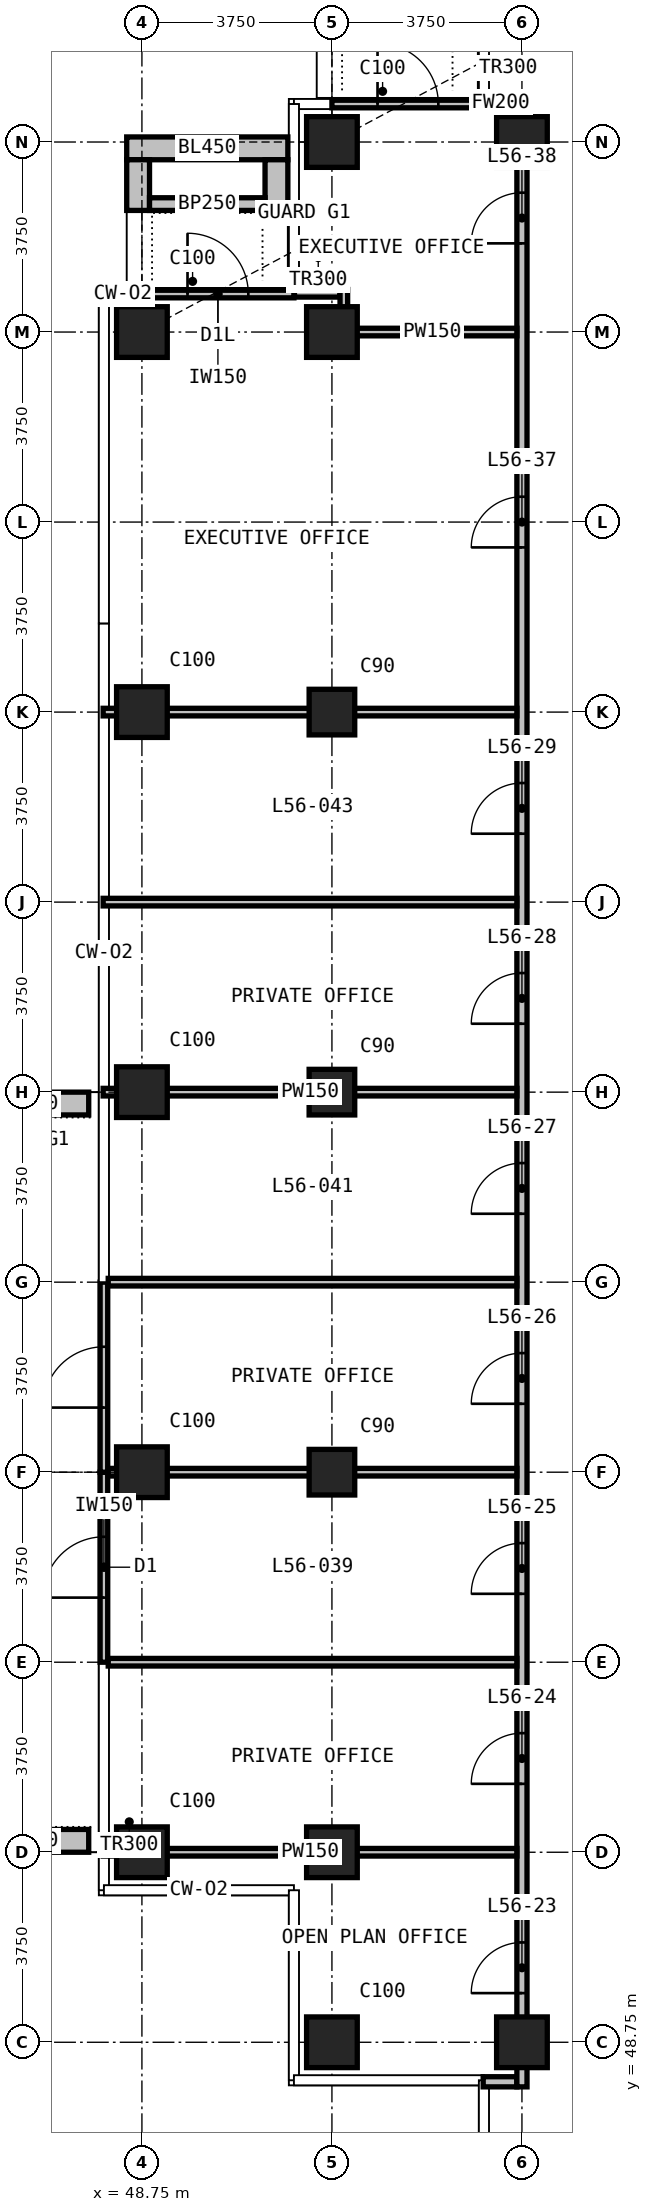
"""IFC4 building model, lengths in metres.
Left out: names, types, materials, properties, quantities, classifications, styles, units other than length and angle.
Written with IfcOpenShell. Run it as: python <this file> out.ifc"""

import sys

from ifc_helpers import new_model, si_unit, direction, frame, frame_2d, origin, origin_2d, place, context, subcontext, project, spatial, rectangle, extrude, element, fill, save


model = new_model("IFC4")
c1 = context("Model", 3, precision=1e-05, world=origin(), true_north=direction((0.0, 1.0)))
c2 = subcontext(c1, "Body", "Model", "MODEL_VIEW")
j1 = project(units=[si_unit("LENGTHUNIT", "METRE"), si_unit("PLANEANGLEUNIT", "RADIAN")], contexts=[c1])
p1 = place(None, origin())
s1 = spatial("IfcSite", under=j1, at=p1, CompositionType="ELEMENT")
p2 = place(p1, origin())
s2 = spatial("IfcBuilding", under=s1, at=p2, CompositionType="ELEMENT")
p3 = place(p2, frame((0.0, 0.0, 217.5)))
s3 = spatial("IfcBuildingStorey", under=s2, at=p3, CompositionType="ELEMENT", Elevation=217.5)
for number, where, z_axis, x_axis in (
    (1, (48.75, 52.5, 0.0), (0.0, 0.0, 1.0), (1.0, 0.0, 0.0)),
    (2, (48.75, 60.0, 0.0), (0.0, 0.0, 1.0), (1.0, 0.0, 0.0)),
    (3, (48.75, 67.5, 0.0), (0.0, 0.0, 1.0), (1.0, 0.0, 0.0)),
    (4, (48.75, 75.0, 0.0), (0.0, 0.0, 1.0), (1.0, 0.0, 0.0)),
    (5, (48.75, 82.5, 0.0), (0.0, 0.0, 1.0), (1.0, 0.0, 0.0)),
    (6, (52.5, 48.75, 0.0), (0.0, 0.0, 1.0), (1.0, 0.0, 0.0)),
    (7, (52.5, 52.5, 0.0), (0.0, 0.0, 1.0), (1.0, 0.0, 0.0)),
):
    element("IfcColumn", number, at=place(p3, frame(where, z_axis=z_axis, x_axis=x_axis)), inside=s3, PredefinedType="COLUMN", context=c2, shape_type="SweptSolid", body=[
        extrude(rectangle(XDim=1.0, YDim=1.0, at=origin_2d()), origin(), (0.0, 0.0, 1.0), 3.6),
    ])
for number, where, z_axis, x_axis in (
    (8, (52.5, 60.0, 0.0), (0.0, 0.0, 1.0), (1.0, 0.0, 0.0)),
    (9, (52.5, 67.5, 0.0), (0.0, 0.0, 1.0), (1.0, 0.0, 0.0)),
    (10, (52.5, 75.0, 0.0), (0.0, 0.0, 1.0), (1.0, 0.0, 0.0)),
):
    element("IfcColumn", number, at=place(p3, frame(where, z_axis=z_axis, x_axis=x_axis)), inside=s3, PredefinedType="COLUMN", context=c2, shape_type="SweptSolid", body=[
        extrude(rectangle(XDim=0.9, YDim=0.9, at=origin_2d()), origin(), (0.0, 0.0, 1.0), 3.6),
    ])
for number, where, z_axis, x_axis in (
    (11, (52.5, 82.5, 0.0), (0.0, 0.0, 1.0), (1.0, 0.0, 0.0)),
    (12, (52.5, 86.25, 0.0), (0.0, 0.0, 1.0), (1.0, 0.0, 0.0)),
    (13, (56.25, 48.75, 0.0), (0.0, 0.0, 1.0), (1.0, 0.0, 0.0)),
    (14, (56.25, 86.25, 0.0), (0.0, 0.0, 1.0), (1.0, 0.0, 0.0)),
):
    element("IfcColumn", number, at=place(p3, frame(where, z_axis=z_axis, x_axis=x_axis)), inside=s3, PredefinedType="COLUMN", context=c2, shape_type="SweptSolid", body=[
        extrude(rectangle(XDim=1.0, YDim=1.0, at=origin_2d()), origin(), (0.0, 0.0, 1.0), 3.6),
    ])
p4 = place(p3, frame((52.5, 87.0, 0.0), z_axis=(0.0, 0.0, 1.0), x_axis=(1.0, 0.0, 0.0)))
e15 = element("IfcWall", 15, at=p4, inside=s3, PredefinedType="SOLIDWALL", context=c2, shape_type="SweptSolid", body=[
    extrude(rectangle(XDim=3.0, YDim=0.15, at=frame_2d((1.5, 0.0))), origin(), (0.0, 0.0, 1.0), 3.3),
])
p5 = place(p4, frame((0.9, 0.0, 0.0)))
e16 = element("IfcOpeningElement", 16, at=p5, cuts=e15, PredefinedType="OPENING", context=c2, shape_type="SweptSolid", body=[
    extrude(rectangle(XDim=1.2, YDim=2.0, at=frame_2d((0.6, 1.0))), frame((0.0, 0.085, 0.0), z_axis=(0.0, -1.0, 0.0), x_axis=(1.0, 0.0, 0.0)), (0.0, 0.0, 1.0), 0.17),
])
p6 = place(p3, frame((48.75, 83.25, 0.0), z_axis=(0.0, 0.0, 1.0), x_axis=(1.0, 0.0, 0.0)))
e17 = element("IfcWall", 17, at=p6, inside=s3, PredefinedType="SOLIDWALL", context=c2, shape_type="SweptSolid", body=[
    extrude(rectangle(XDim=3.0, YDim=0.15, at=frame_2d((1.5, 0.0))), origin(), (0.0, 0.0, 1.0), 3.3),
])
p7 = place(p6, frame((0.9, 0.0, 0.0)))
e18 = element("IfcOpeningElement", 18, at=p7, cuts=e17, PredefinedType="OPENING", context=c2, shape_type="SweptSolid", body=[
    extrude(rectangle(XDim=1.2, YDim=2.0, at=frame_2d((0.6, 1.0))), frame((0.0, 0.085, 0.0), z_axis=(0.0, -1.0, 0.0), x_axis=(1.0, 0.0, 0.0)), (0.0, 0.0, 1.0), 0.17),
])
p8 = place(p3, frame((48.0, 56.25, 0.0), z_axis=(0.0, 0.0, 1.0), x_axis=(0.0, 1.0, 0.0)))
e19 = element("IfcWall", 19, at=p8, inside=s3, PredefinedType="SOLIDWALL", context=c2, shape_type="SweptSolid", body=[
    extrude(rectangle(XDim=3.75, YDim=0.15, at=frame_2d((1.875, 0.0))), origin(), (0.0, 0.0, 1.0), 3.3),
])
p9 = place(p8, frame((1.275, 0.0, 0.0)))
e20 = element("IfcOpeningElement", 20, at=p9, cuts=e19, PredefinedType="OPENING", context=c2, shape_type="SweptSolid", body=[
    extrude(rectangle(XDim=1.2, YDim=2.4, at=frame_2d((0.6, 1.2))), frame((0.0, 0.085, 0.0), z_axis=(0.0, -1.0, 0.0), x_axis=(1.0, 0.0, 0.0)), (0.0, 0.0, 1.0), 0.17),
])
p10 = place(p3, frame((48.0, 60.0, 0.0), z_axis=(0.0, 0.0, 1.0), x_axis=(0.0, 1.0, 0.0)))
e21 = element("IfcWall", 21, at=p10, inside=s3, PredefinedType="SOLIDWALL", context=c2, shape_type="SweptSolid", body=[
    extrude(rectangle(XDim=3.75, YDim=0.15, at=frame_2d((1.875, 0.0))), origin(), (0.0, 0.0, 1.0), 3.3),
])
p11 = place(p10, frame((1.275, 0.0, 0.0)))
e22 = element("IfcOpeningElement", 22, at=p11, cuts=e21, PredefinedType="OPENING", context=c2, shape_type="SweptSolid", body=[
    extrude(rectangle(XDim=1.2, YDim=2.4, at=frame_2d((0.6, 1.2))), frame((0.0, 0.085, 0.0), z_axis=(0.0, -1.0, 0.0), x_axis=(1.0, 0.0, 0.0)), (0.0, 0.0, 1.0), 0.17),
])
p12 = place(p3, frame((48.45, 86.125, 0.0), z_axis=(0.0, 0.0, 1.0), x_axis=(1.0, 0.0, 0.0)))
e23 = element("IfcWall", 23, at=p12, inside=s3, PredefinedType="USERDEFINED", context=c2, shape_type="SweptSolid", body=[
    extrude(rectangle(XDim=3.18, YDim=0.45, at=frame_2d((1.59, 0.0))), origin(), (0.0, 0.0, 1.0), 1.1),
])
for number, where, z_axis, x_axis in (
    (24, (48.675, 84.9, 0.0), (0.0, 0.0, 1.0), (0.0, 1.0, 0.0)),
    (25, (51.405, 84.9, 0.0), (0.0, 0.0, 1.0), (0.0, 1.0, 0.0)),
):
    element("IfcWall", number, at=place(p3, frame(where, z_axis=z_axis, x_axis=x_axis)), inside=s3, PredefinedType="USERDEFINED", context=c2, shape_type="SweptSolid", body=[
        extrude(rectangle(XDim=1.0, YDim=0.45, at=frame_2d((0.5, 0.0))), origin(), (0.0, 0.0, 1.0), 1.1),
    ])
p13 = place(p3, frame((48.9, 85.025, 0.0), z_axis=(0.0, 0.0, 1.0), x_axis=(1.0, 0.0, 0.0)))
e26 = element("IfcWall", 26, at=p13, inside=s3, PredefinedType="USERDEFINED", context=c2, shape_type="SweptSolid", body=[
    extrude(rectangle(XDim=2.28, YDim=0.25, at=frame_2d((1.14, 0.0))), origin(), (0.0, 0.0, 1.0), 1.0),
])
for number, where, z_axis, x_axis in (
    (27, (47.7, 52.725, 0.0), (0.0, 0.0, 1.0), (-1.0, 0.0, 0.0)),
    (28, (47.7, 67.275, 0.0), (0.0, 0.0, 1.0), (-1.0, 0.0, 0.0)),
):
    element("IfcWall", number, at=place(p3, frame(where, z_axis=z_axis, x_axis=x_axis)), inside=s3, PredefinedType="USERDEFINED", context=c2, shape_type="SweptSolid", body=[
        extrude(rectangle(XDim=2.35, YDim=0.45, at=frame_2d((1.175, 0.0))), origin(), (0.0, 0.0, 1.0), 1.1),
    ])
p14 = place(p3, frame((55.485, 47.97, 0.0), z_axis=(0.0, 0.0, 1.0), x_axis=(1.0, 0.0, 0.0)))
e29 = element("IfcWall", 29, at=p14, inside=s3, PredefinedType="PARTITIONING", context=c2, shape_type="SweptSolid", body=[
    extrude(rectangle(XDim=0.665, YDim=0.2, at=frame_2d((0.333, 0.0))), origin(), (0.0, 0.0, 1.0), 3.3),
])
p15 = place(p3, frame((55.51, 87.03, 0.0), z_axis=(0.0, 0.0, 1.0), x_axis=(1.0, 0.0, 0.0)))
e30 = element("IfcWall", 30, at=p15, inside=s3, PredefinedType="PARTITIONING", context=c2, shape_type="SweptSolid", body=[
    extrude(rectangle(XDim=0.64, YDim=0.2, at=frame_2d((0.32, 0.0))), origin(), (0.0, 0.0, 1.0), 3.3),
])
p16 = place(p3, frame((56.25, 47.87, 0.0), z_axis=(0.0, 0.0, 1.0), x_axis=(0.0, 1.0, 0.0)))
e31 = element("IfcWall", 31, at=p16, inside=s3, PredefinedType="PARTITIONING", context=c2, shape_type="SweptSolid", body=[
    extrude(rectangle(XDim=39.26, YDim=0.2, at=frame_2d((19.63, 0.0))), origin(), (0.0, 0.0, 1.0), 3.3),
])
p17 = place(p16, frame((1.85, 0.0, 0.0)))
e32 = element("IfcOpeningElement", 32, at=p17, cuts=e31, PredefinedType="OPENING", context=c2, shape_type="SweptSolid", body=[
    extrude(rectangle(XDim=1.0, YDim=2.2, at=frame_2d((0.5, 1.1))), frame((0.0, 0.11, 0.0), z_axis=(0.0, -1.0, 0.0), x_axis=(1.0, 0.0, 0.0)), (0.0, 0.0, 1.0), 0.22),
])
p18 = place(p16, frame((5.98, 0.0, 0.0)))
e33 = element("IfcOpeningElement", 33, at=p18, cuts=e31, PredefinedType="OPENING", context=c2, shape_type="SweptSolid", body=[
    extrude(rectangle(XDim=1.0, YDim=2.2, at=frame_2d((0.5, 1.1))), frame((0.0, 0.11, 0.0), z_axis=(0.0, -1.0, 0.0), x_axis=(1.0, 0.0, 0.0)), (0.0, 0.0, 1.0), 0.22),
])
p19 = place(p16, frame((9.73, 0.0, 0.0)))
e34 = element("IfcOpeningElement", 34, at=p19, cuts=e31, PredefinedType="OPENING", context=c2, shape_type="SweptSolid", body=[
    extrude(rectangle(XDim=1.0, YDim=2.2, at=frame_2d((0.5, 1.1))), frame((0.0, 0.11, 0.0), z_axis=(0.0, -1.0, 0.0), x_axis=(1.0, 0.0, 0.0)), (0.0, 0.0, 1.0), 0.22),
])
p20 = place(p16, frame((13.48, 0.0, 0.0)))
e35 = element("IfcOpeningElement", 35, at=p20, cuts=e31, PredefinedType="OPENING", context=c2, shape_type="SweptSolid", body=[
    extrude(rectangle(XDim=1.0, YDim=2.2, at=frame_2d((0.5, 1.1))), frame((0.0, 0.11, 0.0), z_axis=(0.0, -1.0, 0.0), x_axis=(1.0, 0.0, 0.0)), (0.0, 0.0, 1.0), 0.22),
])
p21 = place(p16, frame((17.23, 0.0, 0.0)))
e36 = element("IfcOpeningElement", 36, at=p21, cuts=e31, PredefinedType="OPENING", context=c2, shape_type="SweptSolid", body=[
    extrude(rectangle(XDim=1.0, YDim=2.2, at=frame_2d((0.5, 1.1))), frame((0.0, 0.11, 0.0), z_axis=(0.0, -1.0, 0.0), x_axis=(1.0, 0.0, 0.0)), (0.0, 0.0, 1.0), 0.22),
])
p22 = place(p16, frame((20.98, 0.0, 0.0)))
e37 = element("IfcOpeningElement", 37, at=p22, cuts=e31, PredefinedType="OPENING", context=c2, shape_type="SweptSolid", body=[
    extrude(rectangle(XDim=1.0, YDim=2.2, at=frame_2d((0.5, 1.1))), frame((0.0, 0.11, 0.0), z_axis=(0.0, -1.0, 0.0), x_axis=(1.0, 0.0, 0.0)), (0.0, 0.0, 1.0), 0.22),
])
p23 = place(p16, frame((24.73, 0.0, 0.0)))
e38 = element("IfcOpeningElement", 38, at=p23, cuts=e31, PredefinedType="OPENING", context=c2, shape_type="SweptSolid", body=[
    extrude(rectangle(XDim=1.0, YDim=2.2, at=frame_2d((0.5, 1.1))), frame((0.0, 0.11, 0.0), z_axis=(0.0, -1.0, 0.0), x_axis=(1.0, 0.0, 0.0)), (0.0, 0.0, 1.0), 0.22),
])
p24 = place(p16, frame((30.38, 0.0, 0.0)))
e39 = element("IfcOpeningElement", 39, at=p24, cuts=e31, PredefinedType="OPENING", context=c2, shape_type="SweptSolid", body=[
    extrude(rectangle(XDim=1.0, YDim=2.2, at=frame_2d((0.5, 1.1))), frame((0.0, 0.11, 0.0), z_axis=(0.0, -1.0, 0.0), x_axis=(1.0, 0.0, 0.0)), (0.0, 0.0, 1.0), 0.22),
])
p25 = place(p16, frame((36.38, 0.0, 0.0)))
e40 = element("IfcOpeningElement", 40, at=p25, cuts=e31, PredefinedType="OPENING", context=c2, shape_type="SweptSolid", body=[
    extrude(rectangle(XDim=1.0, YDim=2.2, at=frame_2d((0.5, 1.1))), frame((0.0, 0.11, 0.0), z_axis=(0.0, -1.0, 0.0), x_axis=(1.0, 0.0, 0.0)), (0.0, 0.0, 1.0), 0.22),
])
p26 = place(p3, frame((47.985, 52.5, 0.0), z_axis=(0.0, 0.0, 1.0), x_axis=(1.0, 0.0, 0.0)))
e41 = element("IfcWall", 41, at=p26, inside=s3, PredefinedType="PARTITIONING", context=c2, shape_type="SweptSolid", body=[
    extrude(rectangle(XDim=8.165, YDim=0.15, at=frame_2d((4.083, 0.0))), origin(), (0.0, 0.0, 1.0), 3.3),
])
for number, where, z_axis, x_axis in (
    (42, (48.085, 56.25, 0.0), (0.0, 0.0, 1.0), (1.0, 0.0, 0.0)),
    (43, (48.085, 60.0, 0.0), (0.0, 0.0, 1.0), (1.0, 0.0, 0.0)),
    (44, (48.085, 63.75, 0.0), (0.0, 0.0, 1.0), (1.0, 0.0, 0.0)),
):
    element("IfcWall", number, at=place(p3, frame(where, z_axis=z_axis, x_axis=x_axis)), inside=s3, PredefinedType="PARTITIONING", context=c2, shape_type="SweptSolid", body=[
        extrude(rectangle(XDim=8.065, YDim=0.15, at=frame_2d((4.032, 0.0))), origin(), (0.0, 0.0, 1.0), 3.3),
    ])
for number, where, z_axis, x_axis in (
    (45, (47.985, 67.5, 0.0), (0.0, 0.0, 1.0), (1.0, 0.0, 0.0)),
    (46, (47.985, 71.25, 0.0), (0.0, 0.0, 1.0), (1.0, 0.0, 0.0)),
    (47, (47.985, 75.0, 0.0), (0.0, 0.0, 1.0), (1.0, 0.0, 0.0)),
):
    element("IfcWall", number, at=place(p3, frame(where, z_axis=z_axis, x_axis=x_axis)), inside=s3, PredefinedType="PARTITIONING", context=c2, shape_type="SweptSolid", body=[
        extrude(rectangle(XDim=8.165, YDim=0.15, at=frame_2d((4.083, 0.0))), origin(), (0.0, 0.0, 1.0), 3.3),
    ])
p27 = place(p3, frame((52.81, 82.5, 0.0), z_axis=(0.0, 0.0, 1.0), x_axis=(1.0, 0.0, 0.0)))
e48 = element("IfcWall", 48, at=p27, inside=s3, PredefinedType="PARTITIONING", context=c2, shape_type="SweptSolid", body=[
    extrude(rectangle(XDim=3.34, YDim=0.15, at=frame_2d((1.67, 0.0))), origin(), (0.0, 0.0, 1.0), 3.3),
])
p28 = place(p3, frame((51.76, 83.265, 0.0), z_axis=(0.0, 0.0, 1.0), x_axis=(1.0, 0.0, 0.0)))
e49 = element("IfcWall", 49, at=p28, inside=s3, PredefinedType="PARTITIONING", context=c2, shape_type="SweptSolid", body=[
    extrude(rectangle(XDim=0.9, YDim=0.15, at=frame_2d((0.45, 0.0))), origin(), (0.0, 0.0, 1.0), 3.3),
])
p29 = place(p3, frame((52.735, 82.425, 0.0), z_axis=(0.0, 0.0, 1.0), x_axis=(0.0, 1.0, 0.0)))
e50 = element("IfcWall", 50, at=p29, inside=s3, PredefinedType="PARTITIONING", context=c2, shape_type="SweptSolid", body=[
    extrude(rectangle(XDim=0.915, YDim=0.15, at=frame_2d((0.458, 0.0))), origin(), (0.0, 0.0, 1.0), 3.3),
])
p30 = place(p5, origin())
e51 = element("IfcDoor", 51, at=p30, inside=s3, OperationType="SINGLE_SWING_LEFT", PredefinedType="DOOR", context=c2, shape_type="SweptSolid", body=[
    extrude(rectangle(XDim=1.2, YDim=2.0, at=frame_2d((0.6, 1.0))), frame((0.0, 0.025, 0.0), z_axis=(0.0, -1.0, 0.0), x_axis=(1.0, 0.0, 0.0)), (0.0, 0.0, 1.0), 0.05),
])
fill(e16, e51)
p31 = place(p7, origin())
e52 = element("IfcDoor", 52, at=p31, inside=s3, OperationType="SINGLE_SWING_LEFT", PredefinedType="DOOR", context=c2, shape_type="SweptSolid", body=[
    extrude(rectangle(XDim=1.2, YDim=2.0, at=frame_2d((0.6, 1.0))), frame((0.0, 0.025, 0.0), z_axis=(0.0, -1.0, 0.0), x_axis=(1.0, 0.0, 0.0)), (0.0, 0.0, 1.0), 0.05),
])
fill(e18, e52)
p32 = place(p9, origin())
e53 = element("IfcDoor", 53, at=p32, inside=s3, OperationType="SINGLE_SWING_LEFT", PredefinedType="DOOR", context=c2, shape_type="SweptSolid", body=[
    extrude(rectangle(XDim=1.2, YDim=2.4, at=frame_2d((0.6, 1.2))), frame((0.0, 0.025, 0.0), z_axis=(0.0, -1.0, 0.0), x_axis=(1.0, 0.0, 0.0)), (0.0, 0.0, 1.0), 0.05),
])
fill(e20, e53)
p33 = place(p11, origin())
e54 = element("IfcDoor", 54, at=p33, inside=s3, OperationType="SINGLE_SWING_LEFT", PredefinedType="DOOR", context=c2, shape_type="SweptSolid", body=[
    extrude(rectangle(XDim=1.2, YDim=2.4, at=frame_2d((0.6, 1.2))), frame((0.0, 0.025, 0.0), z_axis=(0.0, -1.0, 0.0), x_axis=(1.0, 0.0, 0.0)), (0.0, 0.0, 1.0), 0.05),
])
fill(e22, e54)
p34 = place(p17, origin())
e55 = element("IfcDoor", 55, at=p34, inside=s3, OperationType="SINGLE_SWING_LEFT", PredefinedType="DOOR", context=c2, shape_type="SweptSolid", body=[
    extrude(rectangle(XDim=1.0, YDim=2.2, at=frame_2d((0.5, 1.1))), frame((0.0, 0.025, 0.0), z_axis=(0.0, -1.0, 0.0), x_axis=(1.0, 0.0, 0.0)), (0.0, 0.0, 1.0), 0.05),
])
fill(e32, e55)
p35 = place(p18, origin())
e56 = element("IfcDoor", 56, at=p35, inside=s3, OperationType="SINGLE_SWING_LEFT", PredefinedType="DOOR", context=c2, shape_type="SweptSolid", body=[
    extrude(rectangle(XDim=1.0, YDim=2.2, at=frame_2d((0.5, 1.1))), frame((0.0, 0.025, 0.0), z_axis=(0.0, -1.0, 0.0), x_axis=(1.0, 0.0, 0.0)), (0.0, 0.0, 1.0), 0.05),
])
fill(e33, e56)
p36 = place(p19, origin())
e57 = element("IfcDoor", 57, at=p36, inside=s3, OperationType="SINGLE_SWING_RIGHT", PredefinedType="DOOR", context=c2, shape_type="SweptSolid", body=[
    extrude(rectangle(XDim=1.0, YDim=2.2, at=frame_2d((0.5, 1.1))), frame((0.0, 0.025, 0.0), z_axis=(0.0, -1.0, 0.0), x_axis=(1.0, 0.0, 0.0)), (0.0, 0.0, 1.0), 0.05),
])
fill(e34, e57)
p37 = place(p20, origin())
e58 = element("IfcDoor", 58, at=p37, inside=s3, OperationType="SINGLE_SWING_LEFT", PredefinedType="DOOR", context=c2, shape_type="SweptSolid", body=[
    extrude(rectangle(XDim=1.0, YDim=2.2, at=frame_2d((0.5, 1.1))), frame((0.0, 0.025, 0.0), z_axis=(0.0, -1.0, 0.0), x_axis=(1.0, 0.0, 0.0)), (0.0, 0.0, 1.0), 0.05),
])
fill(e35, e58)
p38 = place(p21, origin())
e59 = element("IfcDoor", 59, at=p38, inside=s3, OperationType="SINGLE_SWING_LEFT", PredefinedType="DOOR", context=c2, shape_type="SweptSolid", body=[
    extrude(rectangle(XDim=1.0, YDim=2.2, at=frame_2d((0.5, 1.1))), frame((0.0, 0.025, 0.0), z_axis=(0.0, -1.0, 0.0), x_axis=(1.0, 0.0, 0.0)), (0.0, 0.0, 1.0), 0.05),
])
fill(e36, e59)
p39 = place(p22, origin())
e60 = element("IfcDoor", 60, at=p39, inside=s3, OperationType="SINGLE_SWING_LEFT", PredefinedType="DOOR", context=c2, shape_type="SweptSolid", body=[
    extrude(rectangle(XDim=1.0, YDim=2.2, at=frame_2d((0.5, 1.1))), frame((0.0, 0.025, 0.0), z_axis=(0.0, -1.0, 0.0), x_axis=(1.0, 0.0, 0.0)), (0.0, 0.0, 1.0), 0.05),
])
fill(e37, e60)
p40 = place(p23, origin())
e61 = element("IfcDoor", 61, at=p40, inside=s3, OperationType="SINGLE_SWING_RIGHT", PredefinedType="DOOR", context=c2, shape_type="SweptSolid", body=[
    extrude(rectangle(XDim=1.0, YDim=2.2, at=frame_2d((0.5, 1.1))), frame((0.0, 0.025, 0.0), z_axis=(0.0, -1.0, 0.0), x_axis=(1.0, 0.0, 0.0)), (0.0, 0.0, 1.0), 0.05),
])
fill(e38, e61)
p41 = place(p24, origin())
e62 = element("IfcDoor", 62, at=p41, inside=s3, OperationType="SINGLE_SWING_LEFT", PredefinedType="DOOR", context=c2, shape_type="SweptSolid", body=[
    extrude(rectangle(XDim=1.0, YDim=2.2, at=frame_2d((0.5, 1.1))), frame((0.0, 0.025, 0.0), z_axis=(0.0, -1.0, 0.0), x_axis=(1.0, 0.0, 0.0)), (0.0, 0.0, 1.0), 0.05),
])
fill(e39, e62)
p42 = place(p25, origin())
e63 = element("IfcDoor", 63, at=p42, inside=s3, OperationType="SINGLE_SWING_RIGHT", PredefinedType="DOOR", context=c2, shape_type="SweptSolid", body=[
    extrude(rectangle(XDim=1.0, YDim=2.2, at=frame_2d((0.5, 1.1))), frame((0.0, 0.025, 0.0), z_axis=(0.0, -1.0, 0.0), x_axis=(1.0, 0.0, 0.0)), (0.0, 0.0, 1.0), 0.05),
])
fill(e40, e63)
save(model, sys.argv[1])
